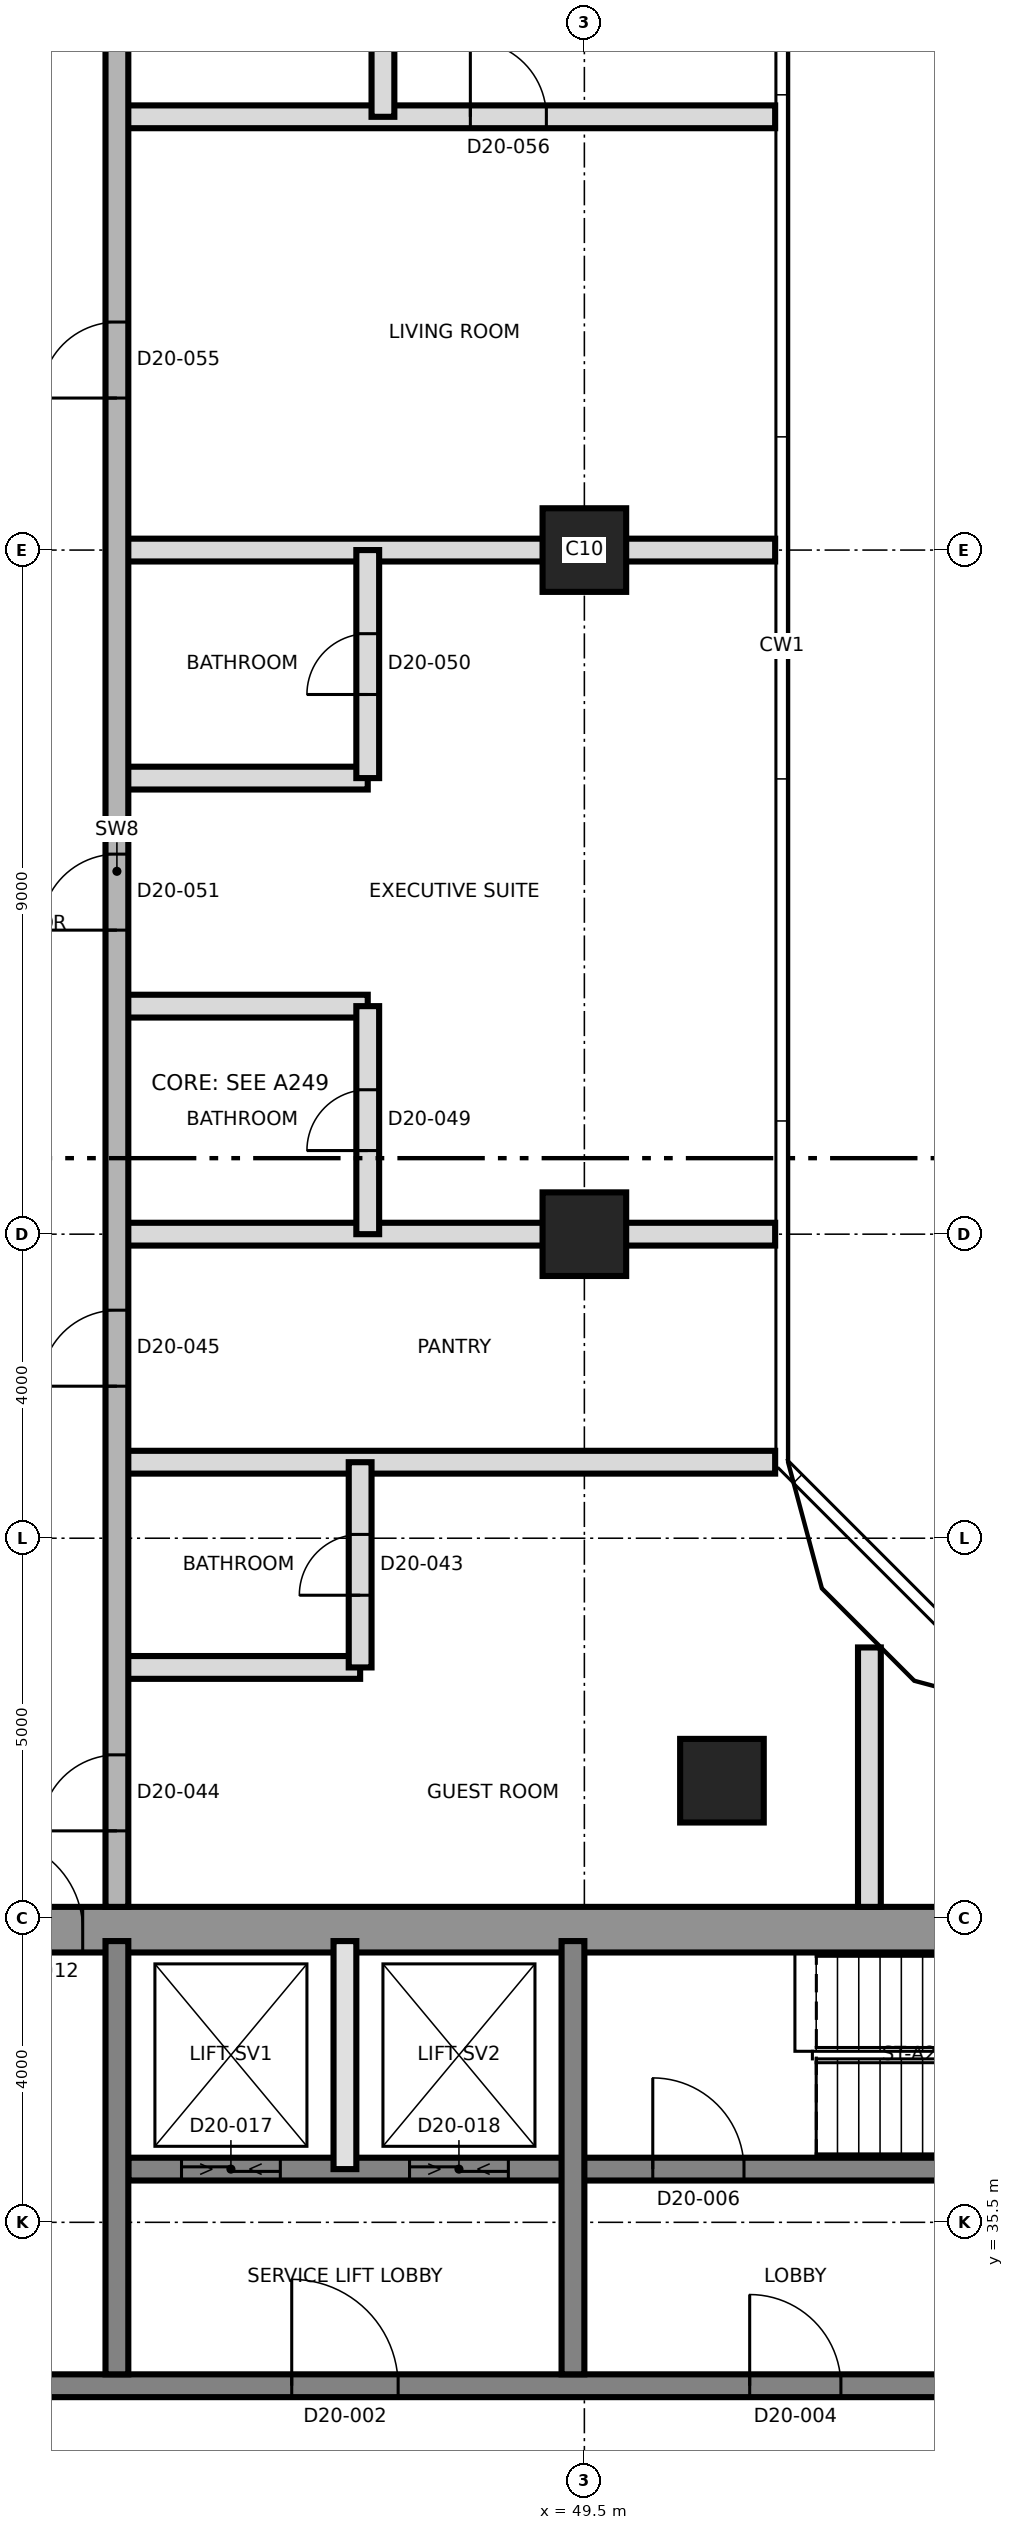
"""IFC4 building model, lengths in metres.
Left out: names, types, materials, properties, quantities, classifications, styles, units other than length and angle.
Written with IfcOpenShell. Run it as: python <this file> out.ifc"""

import sys

from ifc_helpers import new_model, si_unit, direction, frame, frame_2d, origin, origin_2d, place, context, subcontext, project, spatial, rectangle, extrude, element, fill, save


model = new_model("IFC4")
c1 = context("Model", 3, precision=1e-05, world=origin(), true_north=direction((0.0, 1.0)))
c2 = subcontext(c1, "Body", "Model", "MODEL_VIEW")
j1 = project(units=[si_unit("LENGTHUNIT", "METRE"), si_unit("PLANEANGLEUNIT", "RADIAN")], contexts=[c1])
p1 = place(None, origin())
s1 = spatial("IfcSite", under=j1, at=p1, CompositionType="ELEMENT")
p2 = place(p1, origin())
s2 = spatial("IfcBuilding", under=s1, at=p2, CompositionType="ELEMENT")
p3 = place(p2, frame((0.0, 0.0, 186.6)))
s3 = spatial("IfcBuildingStorey", under=s2, at=p3, CompositionType="ELEMENT", Elevation=186.6)
p4 = place(p3, frame((31.2, 39.35, 0.0), z_axis=(0.0, 0.0, 1.0), x_axis=(1.0, 0.0, 0.0)))
e1 = element("IfcWall", 1, at=p4, inside=s3, PredefinedType="SHEAR", context=c2, shape_type="SweptSolid", body=[
    extrude(rectangle(XDim=27.0, YDim=0.6, at=frame_2d((13.5, 0.0))), origin(), (0.0, 0.0, 1.0), 3.7),
])
p5 = place(p4, frame((10.5, 0.0, 0.0)))
e2 = element("IfcOpeningElement", 2, at=p5, cuts=e1, PredefinedType="OPENING", context=c2, shape_type="SweptSolid", body=[
    extrude(rectangle(XDim=1.2, YDim=2.1, at=frame_2d((0.6, 1.05))), frame((0.0, 0.31, 0.0), z_axis=(0.0, -1.0, 0.0), x_axis=(1.0, 0.0, 0.0)), (0.0, 0.0, 1.0), 0.62),
])
p6 = place(p3, frame((31.8, 33.35, 0.0), z_axis=(0.0, 0.0, 1.0), x_axis=(1.0, 0.0, 0.0)))
e3 = element("IfcWall", 3, at=p6, inside=s3, PredefinedType="SHEAR", context=c2, shape_type="SweptSolid", body=[
    extrude(rectangle(XDim=26.4, YDim=0.3, at=frame_2d((13.2, 0.0))), origin(), (0.0, 0.0, 1.0), 3.7),
])
p7 = place(p6, frame((13.85, 0.0, 0.0)))
e4 = element("IfcOpeningElement", 4, at=p7, cuts=e3, PredefinedType="OPENING", context=c2, shape_type="SweptSolid", body=[
    extrude(rectangle(XDim=1.4, YDim=2.1, at=frame_2d((0.7, 1.05))), frame((0.0, 0.16, 0.0), z_axis=(0.0, -1.0, 0.0), x_axis=(1.0, 0.0, 0.0)), (0.0, 0.0, 1.0), 0.32),
])
p8 = place(p6, frame((5.325, 0.0, 0.0)))
e5 = element("IfcOpeningElement", 5, at=p8, cuts=e3, PredefinedType="OPENING", context=c2, shape_type="SweptSolid", body=[
    extrude(rectangle(XDim=1.2, YDim=2.1, at=frame_2d((0.6, 1.05))), frame((0.0, 0.16, 0.0), z_axis=(0.0, -1.0, 0.0), x_axis=(1.0, 0.0, 0.0)), (0.0, 0.0, 1.0), 0.32),
])
p9 = place(p6, frame((19.875, 0.0, 0.0)))
e6 = element("IfcOpeningElement", 6, at=p9, cuts=e3, PredefinedType="OPENING", context=c2, shape_type="SweptSolid", body=[
    extrude(rectangle(XDim=1.2, YDim=2.1, at=frame_2d((0.6, 1.05))), frame((0.0, 0.16, 0.0), z_axis=(0.0, -1.0, 0.0), x_axis=(1.0, 0.0, 0.0)), (0.0, 0.0, 1.0), 0.32),
])
p10 = place(p3, frame((43.5, 36.2, 0.0), z_axis=(0.0, 0.0, 1.0), x_axis=(1.0, 0.0, 0.0)))
e7 = element("IfcWall", 7, at=p10, inside=s3, PredefinedType="SHEAR", context=c2, shape_type="SweptSolid", body=[
    extrude(rectangle(XDim=14.7, YDim=0.3, at=frame_2d((7.35, 0.0))), origin(), (0.0, 0.0, 1.0), 3.7),
])
p11 = place(p10, frame((6.9, 0.0, 0.0)))
e8 = element("IfcOpeningElement", 8, at=p11, cuts=e7, PredefinedType="OPENING", context=c2, shape_type="SweptSolid", body=[
    extrude(rectangle(XDim=1.2, YDim=2.1, at=frame_2d((0.6, 1.05))), frame((0.0, 0.16, 0.0), z_axis=(0.0, -1.0, 0.0), x_axis=(1.0, 0.0, 0.0)), (0.0, 0.0, 1.0), 0.32),
])
p12 = place(p10, frame((0.7, 0.0, 0.0)))
e9 = element("IfcOpeningElement", 9, at=p12, cuts=e7, PredefinedType="OPENING", context=c2, shape_type="SweptSolid", body=[
    extrude(rectangle(XDim=1.3, YDim=2.4, at=frame_2d((0.65, 1.2))), frame((0.0, 0.16, 0.0), z_axis=(0.0, -1.0, 0.0), x_axis=(1.0, 0.0, 0.0)), (0.0, 0.0, 1.0), 0.32),
])
p13 = place(p10, frame((3.7, 0.0, 0.0)))
e10 = element("IfcOpeningElement", 10, at=p13, cuts=e7, PredefinedType="OPENING", context=c2, shape_type="SweptSolid", body=[
    extrude(rectangle(XDim=1.3, YDim=2.4, at=frame_2d((0.65, 1.2))), frame((0.0, 0.16, 0.0), z_axis=(0.0, -1.0, 0.0), x_axis=(1.0, 0.0, 0.0)), (0.0, 0.0, 1.0), 0.32),
])
for number, where, z_axis, x_axis in (
    (11, (43.35, 33.5, 0.0), (0.0, 0.0, 1.0), (0.0, 1.0, 0.0)),
    (12, (49.35, 33.5, 0.0), (0.0, 0.0, 1.0), (0.0, 1.0, 0.0)),
):
    element("IfcWall", number, at=place(p3, frame(where, z_axis=z_axis, x_axis=x_axis)), inside=s3, PredefinedType="SHEAR", context=c2, shape_type="SweptSolid", body=[
        extrude(rectangle(XDim=5.7, YDim=0.3, at=frame_2d((2.85, 0.0))), origin(), (0.0, 0.0, 1.0), 3.7),
    ])
for number, where, z_axis, x_axis in (
    (13, (51.31, 41.31, 0.0), (0.0, 0.0, 1.0), (1.0, 0.0, 0.0)),
    (14, (49.5, 48.5, 0.0), (0.0, 0.0, 1.0), (1.0, 0.0, 0.0)),
    (15, (49.5, 57.5, 0.0), (0.0, 0.0, 1.0), (1.0, 0.0, 0.0)),
):
    element("IfcColumn", number, at=place(p3, frame(where, z_axis=z_axis, x_axis=x_axis)), inside=s3, PredefinedType="COLUMN", context=c2, shape_type="SweptSolid", body=[
        extrude(rectangle(XDim=1.1, YDim=1.1, at=origin_2d()), origin(), (0.0, 0.0, 1.0), 3.7),
    ])
p14 = place(p3, frame((46.35, 36.2, 0.0), z_axis=(0.0, 0.0, 1.0), x_axis=(0.0, 1.0, 0.0)))
e16 = element("IfcWall", 16, at=p14, inside=s3, PredefinedType="SOLIDWALL", context=c2, shape_type="SweptSolid", body=[
    extrude(rectangle(XDim=3.0, YDim=0.3, at=frame_2d((1.5, 0.0))), origin(), (0.0, 0.0, 1.0), 3.4),
])
p15 = place(p3, frame((43.35, 42.8, 0.0), z_axis=(0.0, 0.0, 1.0), x_axis=(1.0, 0.0, 0.0)))
e17 = element("IfcWall", 17, at=p15, inside=s3, PredefinedType="PARTITIONING", context=c2, shape_type="SweptSolid", body=[
    extrude(rectangle(XDim=3.2, YDim=0.3, at=frame_2d((1.6, 0.0))), origin(), (0.0, 0.0, 1.0), 3.4),
])
for number, where, z_axis, x_axis in (
    (18, (43.35, 45.5, 0.0), (0.0, 0.0, 1.0), (1.0, 0.0, 0.0)),
    (19, (43.35, 48.5, 0.0), (0.0, 0.0, 1.0), (1.0, 0.0, 0.0)),
):
    element("IfcWall", number, at=place(p3, frame(where, z_axis=z_axis, x_axis=x_axis)), inside=s3, PredefinedType="PARTITIONING", context=c2, shape_type="SweptSolid", body=[
        extrude(rectangle(XDim=8.66, YDim=0.3, at=frame_2d((4.33, 0.0))), origin(), (0.0, 0.0, 1.0), 3.35),
    ])
for number, where, z_axis, x_axis in (
    (20, (43.35, 51.5, 0.0), (0.0, 0.0, 1.0), (1.0, 0.0, 0.0)),
    (21, (43.35, 54.5, 0.0), (0.0, 0.0, 1.0), (1.0, 0.0, 0.0)),
):
    element("IfcWall", number, at=place(p3, frame(where, z_axis=z_axis, x_axis=x_axis)), inside=s3, PredefinedType="PARTITIONING", context=c2, shape_type="SweptSolid", body=[
        extrude(rectangle(XDim=3.3, YDim=0.3, at=frame_2d((1.65, 0.0))), origin(), (0.0, 0.0, 1.0), 3.4),
    ])
p16 = place(p3, frame((43.35, 57.5, 0.0), z_axis=(0.0, 0.0, 1.0), x_axis=(1.0, 0.0, 0.0)))
e22 = element("IfcWall", 22, at=p16, inside=s3, PredefinedType="PARTITIONING", context=c2, shape_type="SweptSolid", body=[
    extrude(rectangle(XDim=8.66, YDim=0.3, at=frame_2d((4.33, 0.0))), origin(), (0.0, 0.0, 1.0), 3.35),
])
p17 = place(p3, frame((43.35, 63.2, 0.0), z_axis=(0.0, 0.0, 1.0), x_axis=(1.0, 0.0, 0.0)))
e23 = element("IfcWall", 23, at=p17, inside=s3, PredefinedType="PARTITIONING", context=c2, shape_type="SweptSolid", body=[
    extrude(rectangle(XDim=8.66, YDim=0.3, at=frame_2d((4.33, 0.0))), origin(), (0.0, 0.0, 1.0), 3.35),
])
p18 = place(p17, frame((4.65, 0.0, 0.0)))
e24 = element("IfcOpeningElement", 24, at=p18, cuts=e23, PredefinedType="OPENING", context=c2, shape_type="SweptSolid", body=[
    extrude(rectangle(XDim=1.0, YDim=2.1, at=frame_2d((0.5, 1.05))), frame((0.0, 0.16, 0.0), z_axis=(0.0, -1.0, 0.0), x_axis=(1.0, 0.0, 0.0)), (0.0, 0.0, 1.0), 0.32),
])
p19 = place(p3, frame((43.35, 39.65, 0.0), z_axis=(0.0, 0.0, 1.0), x_axis=(0.0, 1.0, 0.0)))
e25 = element("IfcWall", 25, at=p19, inside=s3, PredefinedType="SHEAR", context=c2, shape_type="SweptSolid", body=[
    extrude(rectangle(XDim=27.248, YDim=0.3, at=frame_2d((13.624, 0.0))), origin(), (0.0, 0.0, 1.0), 3.4),
])
p20 = place(p19, frame((1.0, 0.0, 0.0)))
e26 = element("IfcOpeningElement", 26, at=p20, cuts=e25, PredefinedType="OPENING", context=c2, shape_type="SweptSolid", body=[
    extrude(rectangle(XDim=1.0, YDim=2.1, at=frame_2d((0.5, 1.05))), frame((0.0, 0.16, 0.0), z_axis=(0.0, -1.0, 0.0), x_axis=(1.0, 0.0, 0.0)), (0.0, 0.0, 1.0), 0.32),
])
p21 = place(p19, frame((6.85, 0.0, 0.0)))
e27 = element("IfcOpeningElement", 27, at=p21, cuts=e25, PredefinedType="OPENING", context=c2, shape_type="SweptSolid", body=[
    extrude(rectangle(XDim=1.0, YDim=2.1, at=frame_2d((0.5, 1.05))), frame((0.0, 0.16, 0.0), z_axis=(0.0, -1.0, 0.0), x_axis=(1.0, 0.0, 0.0)), (0.0, 0.0, 1.0), 0.32),
])
p22 = place(p19, frame((12.85, 0.0, 0.0)))
e28 = element("IfcOpeningElement", 28, at=p22, cuts=e25, PredefinedType="OPENING", context=c2, shape_type="SweptSolid", body=[
    extrude(rectangle(XDim=1.0, YDim=2.1, at=frame_2d((0.5, 1.05))), frame((0.0, 0.16, 0.0), z_axis=(0.0, -1.0, 0.0), x_axis=(1.0, 0.0, 0.0)), (0.0, 0.0, 1.0), 0.32),
])
p23 = place(p19, frame((19.85, 0.0, 0.0)))
e29 = element("IfcOpeningElement", 29, at=p23, cuts=e25, PredefinedType="OPENING", context=c2, shape_type="SweptSolid", body=[
    extrude(rectangle(XDim=1.0, YDim=2.1, at=frame_2d((0.5, 1.05))), frame((0.0, 0.16, 0.0), z_axis=(0.0, -1.0, 0.0), x_axis=(1.0, 0.0, 0.0)), (0.0, 0.0, 1.0), 0.32),
])
p24 = place(p3, frame((46.55, 42.8, 0.0), z_axis=(0.0, 0.0, 1.0), x_axis=(0.0, 1.0, 0.0)))
e30 = element("IfcWall", 30, at=p24, inside=s3, PredefinedType="PARTITIONING", context=c2, shape_type="SweptSolid", body=[
    extrude(rectangle(XDim=2.7, YDim=0.3, at=frame_2d((1.35, 0.0))), origin(), (0.0, 0.0, 1.0), 3.4),
])
p25 = place(p24, frame((0.95, 0.0, 0.0)))
e31 = element("IfcOpeningElement", 31, at=p25, cuts=e30, PredefinedType="OPENING", context=c2, shape_type="SweptSolid", body=[
    extrude(rectangle(XDim=0.8, YDim=2.1, at=frame_2d((0.4, 1.05))), frame((0.0, 0.16, 0.0), z_axis=(0.0, -1.0, 0.0), x_axis=(1.0, 0.0, 0.0)), (0.0, 0.0, 1.0), 0.32),
])
p26 = place(p3, frame((46.65, 48.5, 0.0), z_axis=(0.0, 0.0, 1.0), x_axis=(0.0, 1.0, 0.0)))
e32 = element("IfcWall", 32, at=p26, inside=s3, PredefinedType="PARTITIONING", context=c2, shape_type="SweptSolid", body=[
    extrude(rectangle(XDim=3.0, YDim=0.3, at=frame_2d((1.5, 0.0))), origin(), (0.0, 0.0, 1.0), 3.4),
])
p27 = place(p26, frame((1.1, 0.0, 0.0)))
e33 = element("IfcOpeningElement", 33, at=p27, cuts=e32, PredefinedType="OPENING", context=c2, shape_type="SweptSolid", body=[
    extrude(rectangle(XDim=0.8, YDim=2.1, at=frame_2d((0.4, 1.05))), frame((0.0, 0.16, 0.0), z_axis=(0.0, -1.0, 0.0), x_axis=(1.0, 0.0, 0.0)), (0.0, 0.0, 1.0), 0.32),
])
p28 = place(p3, frame((46.65, 54.5, 0.0), z_axis=(0.0, 0.0, 1.0), x_axis=(0.0, 1.0, 0.0)))
e34 = element("IfcWall", 34, at=p28, inside=s3, PredefinedType="PARTITIONING", context=c2, shape_type="SweptSolid", body=[
    extrude(rectangle(XDim=3.0, YDim=0.3, at=frame_2d((1.5, 0.0))), origin(), (0.0, 0.0, 1.0), 3.35),
])
p29 = place(p28, frame((1.1, 0.0, 0.0)))
e35 = element("IfcOpeningElement", 35, at=p29, cuts=e34, PredefinedType="OPENING", context=c2, shape_type="SweptSolid", body=[
    extrude(rectangle(XDim=0.8, YDim=2.1, at=frame_2d((0.4, 1.05))), frame((0.0, 0.16, 0.0), z_axis=(0.0, -1.0, 0.0), x_axis=(1.0, 0.0, 0.0)), (0.0, 0.0, 1.0), 0.32),
])
p30 = place(p3, frame((46.85, 63.2, 0.0), z_axis=(0.0, 0.0, 1.0), x_axis=(0.0, 1.0, 0.0)))
e36 = element("IfcWall", 36, at=p30, inside=s3, PredefinedType="PARTITIONING", context=c2, shape_type="SweptSolid", body=[
    extrude(rectangle(XDim=3.3, YDim=0.3, at=frame_2d((1.65, 0.0))), origin(), (0.0, 0.0, 1.0), 3.35),
])
p31 = place(p30, frame((1.25, 0.0, 0.0)))
e37 = element("IfcOpeningElement", 37, at=p31, cuts=e36, PredefinedType="OPENING", context=c2, shape_type="SweptSolid", body=[
    extrude(rectangle(XDim=0.8, YDim=2.1, at=frame_2d((0.4, 1.05))), frame((0.0, 0.16, 0.0), z_axis=(0.0, -1.0, 0.0), x_axis=(1.0, 0.0, 0.0)), (0.0, 0.0, 1.0), 0.32),
])
p32 = place(p3, frame((53.25, 39.65, 0.0), z_axis=(0.0, 0.0, 1.0), x_axis=(0.0, 1.0, 0.0)))
e38 = element("IfcWall", 38, at=p32, inside=s3, PredefinedType="PARTITIONING", context=c2, shape_type="SweptSolid", body=[
    extrude(rectangle(XDim=3.413, YDim=0.3, at=frame_2d((1.707, 0.0))), origin(), (0.0, 0.0, 1.0), 3.35),
])
p33 = place(p7, origin())
e39 = element("IfcDoor", 39, at=p33, inside=s3, OperationType="SINGLE_SWING_RIGHT", PredefinedType="DOOR", context=c2, shape_type="SweptSolid", body=[
    extrude(rectangle(XDim=1.4, YDim=2.1, at=frame_2d((0.7, 1.05))), frame((0.0, 0.025, 0.0), z_axis=(0.0, -1.0, 0.0), x_axis=(1.0, 0.0, 0.0)), (0.0, 0.0, 1.0), 0.05),
])
fill(e4, e39)
p34 = place(p9, origin())
e40 = element("IfcDoor", 40, at=p34, inside=s3, OperationType="SINGLE_SWING_RIGHT", PredefinedType="DOOR", context=c2, shape_type="SweptSolid", body=[
    extrude(rectangle(XDim=1.2, YDim=2.1, at=frame_2d((0.6, 1.05))), frame((0.0, 0.025, 0.0), z_axis=(0.0, -1.0, 0.0), x_axis=(1.0, 0.0, 0.0)), (0.0, 0.0, 1.0), 0.05),
])
fill(e6, e40)
p35 = place(p11, origin())
e41 = element("IfcDoor", 41, at=p35, inside=s3, OperationType="SINGLE_SWING_LEFT", PredefinedType="DOOR", context=c2, shape_type="SweptSolid", body=[
    extrude(rectangle(XDim=1.2, YDim=2.1, at=frame_2d((0.6, 1.05))), frame((0.0, 0.025, 0.0), z_axis=(0.0, -1.0, 0.0), x_axis=(1.0, 0.0, 0.0)), (0.0, 0.0, 1.0), 0.05),
])
fill(e8, e41)
p36 = place(p5, origin())
e42 = element("IfcDoor", 42, at=p36, inside=s3, OperationType="SINGLE_SWING_RIGHT", PredefinedType="DOOR", context=c2, shape_type="SweptSolid", body=[
    extrude(rectangle(XDim=1.2, YDim=2.1, at=frame_2d((0.6, 1.05))), frame((0.0, 0.025, 0.0), z_axis=(0.0, -1.0, 0.0), x_axis=(1.0, 0.0, 0.0)), (0.0, 0.0, 1.0), 0.05),
])
fill(e2, e42)
p37 = place(p12, origin())
e43 = element("IfcDoor", 43, at=p37, inside=s3, OperationType="SLIDING_TO_LEFT", PredefinedType="DOOR", context=c2, shape_type="SweptSolid", body=[
    extrude(rectangle(XDim=1.3, YDim=2.4, at=frame_2d((0.65, 1.2))), frame((0.0, 0.025, 0.0), z_axis=(0.0, -1.0, 0.0), x_axis=(1.0, 0.0, 0.0)), (0.0, 0.0, 1.0), 0.05),
])
fill(e9, e43)
p38 = place(p13, origin())
e44 = element("IfcDoor", 44, at=p38, inside=s3, OperationType="SLIDING_TO_LEFT", PredefinedType="DOOR", context=c2, shape_type="SweptSolid", body=[
    extrude(rectangle(XDim=1.3, YDim=2.4, at=frame_2d((0.65, 1.2))), frame((0.0, 0.025, 0.0), z_axis=(0.0, -1.0, 0.0), x_axis=(1.0, 0.0, 0.0)), (0.0, 0.0, 1.0), 0.05),
])
fill(e10, e44)
p39 = place(p25, origin())
e45 = element("IfcDoor", 45, at=p39, inside=s3, OperationType="SINGLE_SWING_RIGHT", PredefinedType="DOOR", context=c2, shape_type="SweptSolid", body=[
    extrude(rectangle(XDim=0.8, YDim=2.1, at=frame_2d((0.4, 1.05))), frame((0.0, 0.025, 0.0), z_axis=(0.0, -1.0, 0.0), x_axis=(1.0, 0.0, 0.0)), (0.0, 0.0, 1.0), 0.05),
])
fill(e31, e45)
p40 = place(p20, origin())
e46 = element("IfcDoor", 46, at=p40, inside=s3, OperationType="SINGLE_SWING_LEFT", PredefinedType="DOOR", context=c2, shape_type="SweptSolid", body=[
    extrude(rectangle(XDim=1.0, YDim=2.1, at=frame_2d((0.5, 1.05))), frame((0.0, 0.025, 0.0), z_axis=(0.0, -1.0, 0.0), x_axis=(1.0, 0.0, 0.0)), (0.0, 0.0, 1.0), 0.05),
])
fill(e26, e46)
p41 = place(p21, origin())
e47 = element("IfcDoor", 47, at=p41, inside=s3, OperationType="SINGLE_SWING_LEFT", PredefinedType="DOOR", context=c2, shape_type="SweptSolid", body=[
    extrude(rectangle(XDim=1.0, YDim=2.1, at=frame_2d((0.5, 1.05))), frame((0.0, 0.025, 0.0), z_axis=(0.0, -1.0, 0.0), x_axis=(1.0, 0.0, 0.0)), (0.0, 0.0, 1.0), 0.05),
])
fill(e27, e47)
p42 = place(p27, origin())
e48 = element("IfcDoor", 48, at=p42, inside=s3, OperationType="SINGLE_SWING_RIGHT", PredefinedType="DOOR", context=c2, shape_type="SweptSolid", body=[
    extrude(rectangle(XDim=0.8, YDim=2.1, at=frame_2d((0.4, 1.05))), frame((0.0, 0.025, 0.0), z_axis=(0.0, -1.0, 0.0), x_axis=(1.0, 0.0, 0.0)), (0.0, 0.0, 1.0), 0.05),
])
fill(e33, e48)
p43 = place(p29, origin())
e49 = element("IfcDoor", 49, at=p43, inside=s3, OperationType="SINGLE_SWING_LEFT", PredefinedType="DOOR", context=c2, shape_type="SweptSolid", body=[
    extrude(rectangle(XDim=0.8, YDim=2.1, at=frame_2d((0.4, 1.05))), frame((0.0, 0.025, 0.0), z_axis=(0.0, -1.0, 0.0), x_axis=(1.0, 0.0, 0.0)), (0.0, 0.0, 1.0), 0.05),
])
fill(e35, e49)
p44 = place(p22, origin())
e50 = element("IfcDoor", 50, at=p44, inside=s3, OperationType="SINGLE_SWING_LEFT", PredefinedType="DOOR", context=c2, shape_type="SweptSolid", body=[
    extrude(rectangle(XDim=1.0, YDim=2.1, at=frame_2d((0.5, 1.05))), frame((0.0, 0.025, 0.0), z_axis=(0.0, -1.0, 0.0), x_axis=(1.0, 0.0, 0.0)), (0.0, 0.0, 1.0), 0.05),
])
fill(e28, e50)
p45 = place(p23, origin())
e51 = element("IfcDoor", 51, at=p45, inside=s3, OperationType="SINGLE_SWING_LEFT", PredefinedType="DOOR", context=c2, shape_type="SweptSolid", body=[
    extrude(rectangle(XDim=1.0, YDim=2.1, at=frame_2d((0.5, 1.05))), frame((0.0, 0.025, 0.0), z_axis=(0.0, -1.0, 0.0), x_axis=(1.0, 0.0, 0.0)), (0.0, 0.0, 1.0), 0.05),
])
fill(e29, e51)
p46 = place(p18, origin())
e52 = element("IfcDoor", 52, at=p46, inside=s3, OperationType="SINGLE_SWING_RIGHT", PredefinedType="DOOR", context=c2, shape_type="SweptSolid", body=[
    extrude(rectangle(XDim=1.0, YDim=2.1, at=frame_2d((0.5, 1.05))), frame((0.0, 0.025, 0.0), z_axis=(0.0, -1.0, 0.0), x_axis=(1.0, 0.0, 0.0)), (0.0, 0.0, 1.0), 0.05),
])
fill(e24, e52)
save(model, sys.argv[1])
